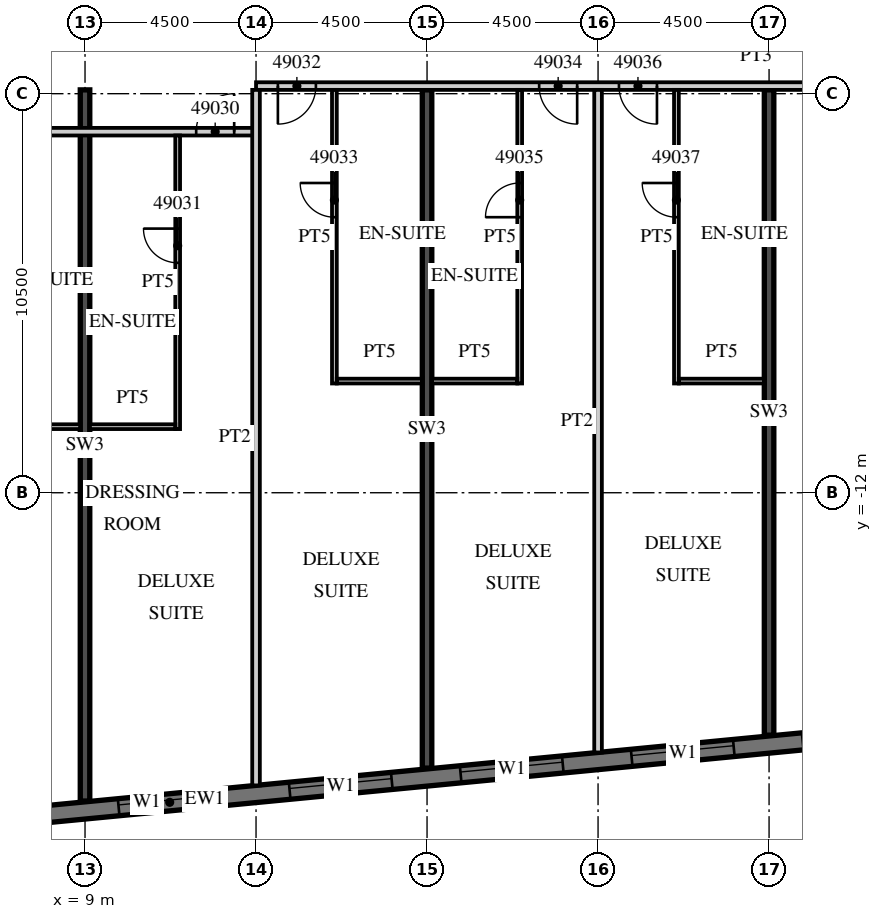
"""IFC4 building model, lengths in metres.
Left out: names, types, materials, properties, quantities, classifications, styles, units other than length and angle.
Written with IfcOpenShell. Run it as: python <this file> out.ifc"""

import sys

from ifc_helpers import new_model, si_unit, direction, frame, frame_2d, origin, place, context, subcontext, project, spatial, rectangle, extrude, element, fill, save


model = new_model("IFC4")
c1 = context("Model", 3, precision=1e-05, world=origin(), true_north=direction((0.0, 1.0)))
c2 = subcontext(c1, "Body", "Model", "MODEL_VIEW")
j1 = project(units=[si_unit("LENGTHUNIT", "METRE"), si_unit("PLANEANGLEUNIT", "RADIAN")], contexts=[c1])
p1 = place(None, origin())
s1 = spatial("IfcSite", under=j1, at=p1, CompositionType="ELEMENT")
p2 = place(p1, origin())
s2 = spatial("IfcBuilding", under=s1, at=p2, CompositionType="ELEMENT")
p3 = place(p2, frame((0.0, 0.0, 203.2)))
s3 = spatial("IfcBuildingStorey", under=s2, at=p3, CompositionType="ELEMENT", Elevation=203.2)
p4 = place(p3, frame((9.0, -20.112, 0.0), z_axis=(0.0, 0.0, 1.0), x_axis=(0.0, 1.0, 0.0)))
e1 = element("IfcWall", 1, at=p4, inside=s3, PredefinedType="SHEAR", context=c2, shape_type="SweptSolid", body=[
    extrude(rectangle(XDim=18.712, YDim=0.25, at=frame_2d((9.356, 0.0))), origin(), (0.0, 0.0, 1.0), 3.0),
])
p5 = place(p3, frame((18.0, -19.245, 0.0), z_axis=(0.0, 0.0, 1.0), x_axis=(0.0, 1.0, 0.0)))
e2 = element("IfcWall", 2, at=p5, inside=s3, PredefinedType="SHEAR", context=c2, shape_type="SweptSolid", body=[
    extrude(rectangle(XDim=17.845, YDim=0.25, at=frame_2d((8.923, 0.0))), origin(), (0.0, 0.0, 1.0), 3.0),
])
p6 = place(p3, frame((27.0, -18.379, 0.0), z_axis=(0.0, 0.0, 1.0), x_axis=(0.0, 1.0, 0.0)))
e3 = element("IfcWall", 3, at=p6, inside=s3, PredefinedType="SHEAR", context=c2, shape_type="SweptSolid", body=[
    extrude(rectangle(XDim=16.979, YDim=0.25, at=frame_2d((8.489, 0.0))), origin(), (0.0, 0.0, 1.0), 3.0),
])
p7 = place(p3, frame((-13.521, -22.529, 0.0), z_axis=(0.0, 0.0, 1.0), x_axis=(0.995396436651, 0.095843277819, 0.0)))
e4 = element("IfcWall", 4, at=p7, inside=s3, PredefinedType="SOLIDWALL", context=c2, shape_type="SweptSolid", body=[
    extrude(rectangle(XDim=51.578, YDim=0.45, at=frame_2d((25.789, 0.0))), origin(), (0.0, 0.0, 1.0), 3.0),
])
p8 = place(p7, frame((0.91, 0.0, 0.45)))
e5 = element("IfcOpeningElement", 5, at=p8, cuts=e4, PredefinedType="OPENING", context=c2, shape_type="SweptSolid", body=[
    extrude(rectangle(XDim=2.7, YDim=2.25, at=frame_2d((1.35, 1.125))), frame((0.0, 0.235, 0.0), z_axis=(0.0, -1.0, 0.0), x_axis=(1.0, 0.0, 0.0)), (0.0, 0.0, 1.0), 0.47),
])
p9 = place(p7, frame((5.431, 0.0, 0.45)))
e6 = element("IfcOpeningElement", 6, at=p9, cuts=e4, PredefinedType="OPENING", context=c2, shape_type="SweptSolid", body=[
    extrude(rectangle(XDim=2.7, YDim=2.25, at=frame_2d((1.35, 1.125))), frame((0.0, 0.235, 0.0), z_axis=(0.0, -1.0, 0.0), x_axis=(1.0, 0.0, 0.0)), (0.0, 0.0, 1.0), 0.47),
])
p10 = place(p7, frame((9.952, 0.0, 0.45)))
e7 = element("IfcOpeningElement", 7, at=p10, cuts=e4, PredefinedType="OPENING", context=c2, shape_type="SweptSolid", body=[
    extrude(rectangle(XDim=2.7, YDim=2.25, at=frame_2d((1.35, 1.125))), frame((0.0, 0.235, 0.0), z_axis=(0.0, -1.0, 0.0), x_axis=(1.0, 0.0, 0.0)), (0.0, 0.0, 1.0), 0.47),
])
p11 = place(p7, frame((14.473, 0.0, 0.45)))
e8 = element("IfcOpeningElement", 8, at=p11, cuts=e4, PredefinedType="OPENING", context=c2, shape_type="SweptSolid", body=[
    extrude(rectangle(XDim=2.7, YDim=2.25, at=frame_2d((1.35, 1.125))), frame((0.0, 0.235, 0.0), z_axis=(0.0, -1.0, 0.0), x_axis=(1.0, 0.0, 0.0)), (0.0, 0.0, 1.0), 0.47),
])
p12 = place(p7, frame((18.994, 0.0, 0.45)))
e9 = element("IfcOpeningElement", 9, at=p12, cuts=e4, PredefinedType="OPENING", context=c2, shape_type="SweptSolid", body=[
    extrude(rectangle(XDim=2.7, YDim=2.25, at=frame_2d((1.35, 1.125))), frame((0.0, 0.235, 0.0), z_axis=(0.0, -1.0, 0.0), x_axis=(1.0, 0.0, 0.0)), (0.0, 0.0, 1.0), 0.47),
])
p13 = place(p7, frame((23.514, 0.0, 0.45)))
e10 = element("IfcOpeningElement", 10, at=p13, cuts=e4, PredefinedType="OPENING", context=c2, shape_type="SweptSolid", body=[
    extrude(rectangle(XDim=2.7, YDim=2.25, at=frame_2d((1.35, 1.125))), frame((0.0, 0.235, 0.0), z_axis=(0.0, -1.0, 0.0), x_axis=(1.0, 0.0, 0.0)), (0.0, 0.0, 1.0), 0.47),
])
p14 = place(p7, frame((28.035, 0.0, 0.45)))
e11 = element("IfcOpeningElement", 11, at=p14, cuts=e4, PredefinedType="OPENING", context=c2, shape_type="SweptSolid", body=[
    extrude(rectangle(XDim=2.7, YDim=2.25, at=frame_2d((1.35, 1.125))), frame((0.0, 0.235, 0.0), z_axis=(0.0, -1.0, 0.0), x_axis=(1.0, 0.0, 0.0)), (0.0, 0.0, 1.0), 0.47),
])
p15 = place(p7, frame((32.556, 0.0, 0.45)))
e12 = element("IfcOpeningElement", 12, at=p15, cuts=e4, PredefinedType="OPENING", context=c2, shape_type="SweptSolid", body=[
    extrude(rectangle(XDim=2.7, YDim=2.25, at=frame_2d((1.35, 1.125))), frame((0.0, 0.235, 0.0), z_axis=(0.0, -1.0, 0.0), x_axis=(1.0, 0.0, 0.0)), (0.0, 0.0, 1.0), 0.47),
])
p16 = place(p7, frame((37.077, 0.0, 0.45)))
e13 = element("IfcOpeningElement", 13, at=p16, cuts=e4, PredefinedType="OPENING", context=c2, shape_type="SweptSolid", body=[
    extrude(rectangle(XDim=2.7, YDim=2.25, at=frame_2d((1.35, 1.125))), frame((0.0, 0.235, 0.0), z_axis=(0.0, -1.0, 0.0), x_axis=(1.0, 0.0, 0.0)), (0.0, 0.0, 1.0), 0.47),
])
p17 = place(p7, frame((41.598, 0.0, 0.45)))
e14 = element("IfcOpeningElement", 14, at=p17, cuts=e4, PredefinedType="OPENING", context=c2, shape_type="SweptSolid", body=[
    extrude(rectangle(XDim=2.7, YDim=2.25, at=frame_2d((1.35, 1.125))), frame((0.0, 0.235, 0.0), z_axis=(0.0, -1.0, 0.0), x_axis=(1.0, 0.0, 0.0)), (0.0, 0.0, 1.0), 0.47),
])
p18 = place(p7, frame((46.119, 0.0, 0.45)))
e15 = element("IfcOpeningElement", 15, at=p18, cuts=e4, PredefinedType="OPENING", context=c2, shape_type="SweptSolid", body=[
    extrude(rectangle(XDim=2.7, YDim=2.25, at=frame_2d((1.35, 1.125))), frame((0.0, 0.235, 0.0), z_axis=(0.0, -1.0, 0.0), x_axis=(1.0, 0.0, 0.0)), (0.0, 0.0, 1.0), 0.47),
])
p19 = place(p3, frame((-13.5, -2.5, 0.0), z_axis=(0.0, 0.0, 1.0), x_axis=(1.0, 0.0, 0.0)))
e16 = element("IfcWall", 16, at=p19, inside=s3, PredefinedType="PARTITIONING", context=c2, shape_type="SweptSolid", body=[
    extrude(rectangle(XDim=27.0, YDim=0.2, at=frame_2d((13.5, 0.0))), origin(), (0.0, 0.0, 1.0), 3.0),
])
p20 = place(p19, frame((2.925, 0.0, 0.0)))
e17 = element("IfcOpeningElement", 17, at=p20, cuts=e16, PredefinedType="OPENING", context=c2, shape_type="SweptSolid", body=[
    extrude(rectangle(XDim=1.0, YDim=2.1, at=frame_2d((0.5, 1.05))), frame((0.0, 0.11, 0.0), z_axis=(0.0, -1.0, 0.0), x_axis=(1.0, 0.0, 0.0)), (0.0, 0.0, 1.0), 0.22),
])
p21 = place(p19, frame((5.075, 0.0, 0.0)))
e18 = element("IfcOpeningElement", 18, at=p21, cuts=e16, PredefinedType="OPENING", context=c2, shape_type="SweptSolid", body=[
    extrude(rectangle(XDim=1.0, YDim=2.1, at=frame_2d((0.5, 1.05))), frame((0.0, 0.11, 0.0), z_axis=(0.0, -1.0, 0.0), x_axis=(1.0, 0.0, 0.0)), (0.0, 0.0, 1.0), 0.22),
])
p22 = place(p19, frame((11.925, 0.0, 0.0)))
e19 = element("IfcOpeningElement", 19, at=p22, cuts=e16, PredefinedType="OPENING", context=c2, shape_type="SweptSolid", body=[
    extrude(rectangle(XDim=1.0, YDim=2.1, at=frame_2d((0.5, 1.05))), frame((0.0, 0.11, 0.0), z_axis=(0.0, -1.0, 0.0), x_axis=(1.0, 0.0, 0.0)), (0.0, 0.0, 1.0), 0.22),
])
p23 = place(p19, frame((15.938, 0.0, 0.0)))
e20 = element("IfcOpeningElement", 20, at=p23, cuts=e16, PredefinedType="OPENING", context=c2, shape_type="SweptSolid", body=[
    extrude(rectangle(XDim=1.2, YDim=2.1, at=frame_2d((0.6, 1.05))), frame((0.0, 0.11, 0.0), z_axis=(0.0, -1.0, 0.0), x_axis=(1.0, 0.0, 0.0)), (0.0, 0.0, 1.0), 0.22),
])
p24 = place(p19, frame((25.425, 0.0, 0.0)))
e21 = element("IfcOpeningElement", 21, at=p24, cuts=e16, PredefinedType="OPENING", context=c2, shape_type="SweptSolid", body=[
    extrude(rectangle(XDim=1.0, YDim=2.1, at=frame_2d((0.5, 1.05))), frame((0.0, 0.11, 0.0), z_axis=(0.0, -1.0, 0.0), x_axis=(1.0, 0.0, 0.0)), (0.0, 0.0, 1.0), 0.22),
])
p25 = place(p3, frame((13.5, -1.3, 0.0), z_axis=(0.0, 0.0, 1.0), x_axis=(1.0, 0.0, 0.0)))
e22 = element("IfcWall", 22, at=p25, inside=s3, PredefinedType="PARTITIONING", context=c2, shape_type="SweptSolid", body=[
    extrude(rectangle(XDim=26.317, YDim=0.2, at=frame_2d((13.158, 0.0))), origin(), (0.0, 0.0, 1.0), 3.0),
])
p26 = place(p25, frame((0.575, 0.0, 0.0)))
e23 = element("IfcOpeningElement", 23, at=p26, cuts=e22, PredefinedType="OPENING", context=c2, shape_type="SweptSolid", body=[
    extrude(rectangle(XDim=1.0, YDim=2.1, at=frame_2d((0.5, 1.05))), frame((0.0, 0.11, 0.0), z_axis=(0.0, -1.0, 0.0), x_axis=(1.0, 0.0, 0.0)), (0.0, 0.0, 1.0), 0.22),
])
p27 = place(p25, frame((7.45, 0.0, 0.0)))
e24 = element("IfcOpeningElement", 24, at=p27, cuts=e22, PredefinedType="OPENING", context=c2, shape_type="SweptSolid", body=[
    extrude(rectangle(XDim=1.0, YDim=2.1, at=frame_2d((0.5, 1.05))), frame((0.0, 0.11, 0.0), z_axis=(0.0, -1.0, 0.0), x_axis=(1.0, 0.0, 0.0)), (0.0, 0.0, 1.0), 0.22),
])
p28 = place(p25, frame((9.55, 0.0, 0.0)))
e25 = element("IfcOpeningElement", 25, at=p28, cuts=e22, PredefinedType="OPENING", context=c2, shape_type="SweptSolid", body=[
    extrude(rectangle(XDim=1.0, YDim=2.1, at=frame_2d((0.5, 1.05))), frame((0.0, 0.11, 0.0), z_axis=(0.0, -1.0, 0.0), x_axis=(1.0, 0.0, 0.0)), (0.0, 0.0, 1.0), 0.22),
])
p29 = place(p25, frame((15.938, 0.0, 0.0)))
e26 = element("IfcOpeningElement", 26, at=p29, cuts=e22, PredefinedType="OPENING", context=c2, shape_type="SweptSolid", body=[
    extrude(rectangle(XDim=1.2, YDim=2.1, at=frame_2d((0.6, 1.05))), frame((0.0, 0.11, 0.0), z_axis=(0.0, -1.0, 0.0), x_axis=(1.0, 0.0, 0.0)), (0.0, 0.0, 1.0), 0.22),
])
p30 = place(p25, frame((25.267, 0.0, 0.0)))
e27 = element("IfcOpeningElement", 27, at=p30, cuts=e22, PredefinedType="OPENING", context=c2, shape_type="SweptSolid", body=[
    extrude(rectangle(XDim=0.9, YDim=2.1, at=frame_2d((0.45, 1.05))), frame((0.0, 0.11, 0.0), z_axis=(0.0, -1.0, 0.0), x_axis=(1.0, 0.0, 0.0)), (0.0, 0.0, 1.0), 0.22),
])
p31 = place(p3, frame((6.075, -10.262, 0.0), z_axis=(0.0, 0.0, 1.0), x_axis=(1.0, 0.0, 0.0)))
e28 = element("IfcWall", 28, at=p31, inside=s3, PredefinedType="PARTITIONING", context=c2, shape_type="SweptSolid", body=[
    extrude(rectangle(XDim=2.8, YDim=0.125, at=frame_2d((1.4, 0.0))), origin(), (0.0, 0.0, 1.0), 3.0),
])
p32 = place(p3, frame((13.5, -19.701, 0.0), z_axis=(0.0, 0.0, 1.0), x_axis=(0.0, 1.0, 0.0)))
e29 = element("IfcWall", 29, at=p32, inside=s3, PredefinedType="PARTITIONING", context=c2, shape_type="SweptSolid", body=[
    extrude(rectangle(XDim=18.301, YDim=0.2, at=frame_2d((9.15, 0.0))), origin(), (0.0, 0.0, 1.0), 3.0),
])
p33 = place(p3, frame((11.438, -10.325, 0.0), z_axis=(0.0, 0.0, 1.0), x_axis=(0.0, 1.0, 0.0)))
e30 = element("IfcWall", 30, at=p33, inside=s3, PredefinedType="PARTITIONING", context=c2, shape_type="SweptSolid", body=[
    extrude(rectangle(XDim=7.725, YDim=0.125, at=frame_2d((3.862, 0.0))), origin(), (0.0, 0.0, 1.0), 3.0),
])
p34 = place(p33, frame((4.375, 0.0, 0.0)))
e31 = element("IfcOpeningElement", 31, at=p34, cuts=e30, PredefinedType="OPENING", context=c2, shape_type="SweptSolid", body=[
    extrude(rectangle(XDim=0.9, YDim=2.1, at=frame_2d((0.45, 1.05))), frame((0.0, 0.073, 0.0), z_axis=(0.0, -1.0, 0.0), x_axis=(1.0, 0.0, 0.0)), (0.0, 0.0, 1.0), 0.145),
])
p35 = place(p3, frame((9.125, -10.262, 0.0), z_axis=(0.0, 0.0, 1.0), x_axis=(1.0, 0.0, 0.0)))
e32 = element("IfcWall", 32, at=p35, inside=s3, PredefinedType="PARTITIONING", context=c2, shape_type="SweptSolid", body=[
    extrude(rectangle(XDim=2.25, YDim=0.125, at=frame_2d((1.125, 0.0))), origin(), (0.0, 0.0, 1.0), 3.0),
])
p36 = place(p3, frame((15.562, -9.125, 0.0), z_axis=(0.0, 0.0, 1.0), x_axis=(0.0, 1.0, 0.0)))
e33 = element("IfcWall", 33, at=p36, inside=s3, PredefinedType="PARTITIONING", context=c2, shape_type="SweptSolid", body=[
    extrude(rectangle(XDim=7.725, YDim=0.125, at=frame_2d((3.863, 0.0))), origin(), (0.0, 0.0, 1.0), 3.0),
])
p37 = place(p36, frame((4.375, 0.0, 0.0)))
e34 = element("IfcOpeningElement", 34, at=p37, cuts=e33, PredefinedType="OPENING", context=c2, shape_type="SweptSolid", body=[
    extrude(rectangle(XDim=0.9, YDim=2.1, at=frame_2d((0.45, 1.05))), frame((0.0, 0.073, 0.0), z_axis=(0.0, -1.0, 0.0), x_axis=(1.0, 0.0, 0.0)), (0.0, 0.0, 1.0), 0.145),
])
p38 = place(p3, frame((15.625, -9.062, 0.0), z_axis=(0.0, 0.0, 1.0), x_axis=(1.0, 0.0, 0.0)))
e35 = element("IfcWall", 35, at=p38, inside=s3, PredefinedType="PARTITIONING", context=c2, shape_type="SweptSolid", body=[
    extrude(rectangle(XDim=2.25, YDim=0.125, at=frame_2d((1.125, 0.0))), origin(), (0.0, 0.0, 1.0), 3.0),
])
p39 = place(p3, frame((22.5, -18.834, 0.0), z_axis=(0.0, 0.0, 1.0), x_axis=(0.0, 1.0, 0.0)))
e36 = element("IfcWall", 36, at=p39, inside=s3, PredefinedType="PARTITIONING", context=c2, shape_type="SweptSolid", body=[
    extrude(rectangle(XDim=17.434, YDim=0.2, at=frame_2d((8.717, 0.0))), origin(), (0.0, 0.0, 1.0), 3.0),
])
p40 = place(p3, frame((20.438, -9.125, 0.0), z_axis=(0.0, 0.0, 1.0), x_axis=(0.0, 1.0, 0.0)))
e37 = element("IfcWall", 37, at=p40, inside=s3, PredefinedType="PARTITIONING", context=c2, shape_type="SweptSolid", body=[
    extrude(rectangle(XDim=7.725, YDim=0.125, at=frame_2d((3.863, 0.0))), origin(), (0.0, 0.0, 1.0), 3.0),
])
p41 = place(p40, frame((4.375, 0.0, 0.0)))
e38 = element("IfcOpeningElement", 38, at=p41, cuts=e37, PredefinedType="OPENING", context=c2, shape_type="SweptSolid", body=[
    extrude(rectangle(XDim=0.9, YDim=2.1, at=frame_2d((0.45, 1.05))), frame((0.0, 0.073, 0.0), z_axis=(0.0, -1.0, 0.0), x_axis=(1.0, 0.0, 0.0)), (0.0, 0.0, 1.0), 0.145),
])
p42 = place(p3, frame((18.125, -9.062, 0.0), z_axis=(0.0, 0.0, 1.0), x_axis=(1.0, 0.0, 0.0)))
e39 = element("IfcWall", 39, at=p42, inside=s3, PredefinedType="PARTITIONING", context=c2, shape_type="SweptSolid", body=[
    extrude(rectangle(XDim=2.25, YDim=0.125, at=frame_2d((1.125, 0.0))), origin(), (0.0, 0.0, 1.0), 3.0),
])
p43 = place(p3, frame((24.562, -9.125, 0.0), z_axis=(0.0, 0.0, 1.0), x_axis=(0.0, 1.0, 0.0)))
e40 = element("IfcWall", 40, at=p43, inside=s3, PredefinedType="PARTITIONING", context=c2, shape_type="SweptSolid", body=[
    extrude(rectangle(XDim=7.725, YDim=0.125, at=frame_2d((3.863, 0.0))), origin(), (0.0, 0.0, 1.0), 3.0),
])
p44 = place(p43, frame((4.375, 0.0, 0.0)))
e41 = element("IfcOpeningElement", 41, at=p44, cuts=e40, PredefinedType="OPENING", context=c2, shape_type="SweptSolid", body=[
    extrude(rectangle(XDim=0.9, YDim=2.1, at=frame_2d((0.45, 1.05))), frame((0.0, 0.073, 0.0), z_axis=(0.0, -1.0, 0.0), x_axis=(1.0, 0.0, 0.0)), (0.0, 0.0, 1.0), 0.145),
])
p45 = place(p3, frame((24.625, -9.062, 0.0), z_axis=(0.0, 0.0, 1.0), x_axis=(1.0, 0.0, 0.0)))
e42 = element("IfcWall", 42, at=p45, inside=s3, PredefinedType="PARTITIONING", context=c2, shape_type="SweptSolid", body=[
    extrude(rectangle(XDim=2.25, YDim=0.125, at=frame_2d((1.125, 0.0))), origin(), (0.0, 0.0, 1.0), 3.0),
])
p46 = place(p13, origin())
e43 = element("IfcWindow", 43, at=p46, inside=s3, PartitioningType="SINGLE_PANEL", PredefinedType="WINDOW", context=c2, shape_type="SweptSolid", body=[
    extrude(rectangle(XDim=2.7, YDim=2.25, at=frame_2d((1.35, 1.125))), frame((0.0, 0.09, 0.0), z_axis=(0.0, -1.0, 0.0), x_axis=(1.0, 0.0, 0.0)), (0.0, 0.0, 1.0), 0.06),
])
fill(e10, e43)
p47 = place(p14, origin())
e44 = element("IfcWindow", 44, at=p47, inside=s3, PartitioningType="SINGLE_PANEL", PredefinedType="WINDOW", context=c2, shape_type="SweptSolid", body=[
    extrude(rectangle(XDim=2.7, YDim=2.25, at=frame_2d((1.35, 1.125))), frame((0.0, 0.09, 0.0), z_axis=(0.0, -1.0, 0.0), x_axis=(1.0, 0.0, 0.0)), (0.0, 0.0, 1.0), 0.06),
])
fill(e11, e44)
p48 = place(p15, origin())
e45 = element("IfcWindow", 45, at=p48, inside=s3, PartitioningType="SINGLE_PANEL", PredefinedType="WINDOW", context=c2, shape_type="SweptSolid", body=[
    extrude(rectangle(XDim=2.7, YDim=2.25, at=frame_2d((1.35, 1.125))), frame((0.0, 0.09, 0.0), z_axis=(0.0, -1.0, 0.0), x_axis=(1.0, 0.0, 0.0)), (0.0, 0.0, 1.0), 0.06),
])
fill(e12, e45)
p49 = place(p16, origin())
e46 = element("IfcWindow", 46, at=p49, inside=s3, PartitioningType="SINGLE_PANEL", PredefinedType="WINDOW", context=c2, shape_type="SweptSolid", body=[
    extrude(rectangle(XDim=2.7, YDim=2.25, at=frame_2d((1.35, 1.125))), frame((0.0, 0.09, 0.0), z_axis=(0.0, -1.0, 0.0), x_axis=(1.0, 0.0, 0.0)), (0.0, 0.0, 1.0), 0.06),
])
fill(e13, e46)
p50 = place(p24, origin())
e47 = element("IfcDoor", 47, at=p50, inside=s3, OperationType="SINGLE_SWING_RIGHT", PredefinedType="DOOR", context=c2, shape_type="SweptSolid", body=[
    extrude(rectangle(XDim=1.0, YDim=2.1, at=frame_2d((0.5, 1.05))), frame((0.0, 0.025, 0.0), z_axis=(0.0, -1.0, 0.0), x_axis=(1.0, 0.0, 0.0)), (0.0, 0.0, 1.0), 0.05),
])
fill(e21, e47)
p51 = place(p34, origin())
e48 = element("IfcDoor", 48, at=p51, inside=s3, OperationType="SINGLE_SWING_RIGHT", PredefinedType="DOOR", context=c2, shape_type="SweptSolid", body=[
    extrude(rectangle(XDim=0.9, YDim=2.1, at=frame_2d((0.45, 1.05))), frame((0.0, 0.025, 0.0), z_axis=(0.0, -1.0, 0.0), x_axis=(1.0, 0.0, 0.0)), (0.0, 0.0, 1.0), 0.05),
])
fill(e31, e48)
p52 = place(p26, origin())
e49 = element("IfcDoor", 49, at=p52, inside=s3, OperationType="SINGLE_SWING_LEFT", PredefinedType="DOOR", context=c2, shape_type="SweptSolid", body=[
    extrude(rectangle(XDim=1.0, YDim=2.1, at=frame_2d((0.5, 1.05))), frame((0.0, 0.025, 0.0), z_axis=(0.0, -1.0, 0.0), x_axis=(1.0, 0.0, 0.0)), (0.0, 0.0, 1.0), 0.05),
])
fill(e23, e49)
p53 = place(p37, origin())
e50 = element("IfcDoor", 50, at=p53, inside=s3, OperationType="SINGLE_SWING_RIGHT", PredefinedType="DOOR", context=c2, shape_type="SweptSolid", body=[
    extrude(rectangle(XDim=0.9, YDim=2.1, at=frame_2d((0.45, 1.05))), frame((0.0, 0.025, 0.0), z_axis=(0.0, -1.0, 0.0), x_axis=(1.0, 0.0, 0.0)), (0.0, 0.0, 1.0), 0.05),
])
fill(e34, e50)
p54 = place(p27, origin())
e51 = element("IfcDoor", 51, at=p54, inside=s3, OperationType="SINGLE_SWING_RIGHT", PredefinedType="DOOR", context=c2, shape_type="SweptSolid", body=[
    extrude(rectangle(XDim=1.0, YDim=2.1, at=frame_2d((0.5, 1.05))), frame((0.0, 0.025, 0.0), z_axis=(0.0, -1.0, 0.0), x_axis=(1.0, 0.0, 0.0)), (0.0, 0.0, 1.0), 0.05),
])
fill(e24, e51)
p55 = place(p41, origin())
e52 = element("IfcDoor", 52, at=p55, inside=s3, OperationType="SINGLE_SWING_LEFT", PredefinedType="DOOR", context=c2, shape_type="SweptSolid", body=[
    extrude(rectangle(XDim=0.9, YDim=2.1, at=frame_2d((0.45, 1.05))), frame((0.0, 0.025, 0.0), z_axis=(0.0, -1.0, 0.0), x_axis=(1.0, 0.0, 0.0)), (0.0, 0.0, 1.0), 0.05),
])
fill(e38, e52)
p56 = place(p28, origin())
e53 = element("IfcDoor", 53, at=p56, inside=s3, OperationType="SINGLE_SWING_RIGHT", PredefinedType="DOOR", context=c2, shape_type="SweptSolid", body=[
    extrude(rectangle(XDim=1.0, YDim=2.1, at=frame_2d((0.5, 1.05))), frame((0.0, 0.025, 0.0), z_axis=(0.0, -1.0, 0.0), x_axis=(1.0, 0.0, 0.0)), (0.0, 0.0, 1.0), 0.05),
])
fill(e25, e53)
p57 = place(p44, origin())
e54 = element("IfcDoor", 54, at=p57, inside=s3, OperationType="SINGLE_SWING_RIGHT", PredefinedType="DOOR", context=c2, shape_type="SweptSolid", body=[
    extrude(rectangle(XDim=0.9, YDim=2.1, at=frame_2d((0.45, 1.05))), frame((0.0, 0.025, 0.0), z_axis=(0.0, -1.0, 0.0), x_axis=(1.0, 0.0, 0.0)), (0.0, 0.0, 1.0), 0.05),
])
fill(e41, e54)
save(model, sys.argv[1])
